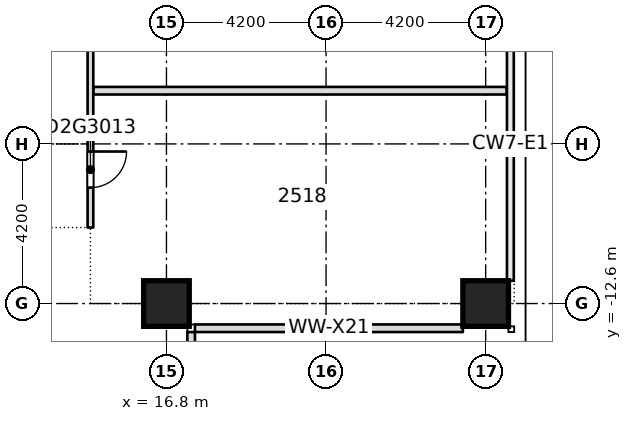
"""IFC4 building model, lengths in metres.
Left out: names, types, materials, properties, quantities, classifications, styles, units other than length and angle.
Written with IfcOpenShell. Run it as: python <this file> out.ifc"""

import sys

from ifc_helpers import new_model, si_unit, direction, frame, frame_2d, origin, origin_2d, place, context, subcontext, project, spatial, rectangle, extrude, element, fill, save


model = new_model("IFC4")
c1 = context("Model", 3, precision=1e-05, world=origin(), true_north=direction((0.0, 1.0)))
c2 = subcontext(c1, "Body", "Model", "MODEL_VIEW")
j1 = project(units=[si_unit("LENGTHUNIT", "METRE"), si_unit("PLANEANGLEUNIT", "RADIAN")], contexts=[c1])
p1 = place(None, origin())
s1 = spatial("IfcSite", under=j1, at=p1, CompositionType="ELEMENT")
p2 = place(p1, origin())
s2 = spatial("IfcBuilding", under=s1, at=p2, CompositionType="ELEMENT")
p3 = place(p2, frame((0.0, 0.0, 101.1)))
s3 = spatial("IfcBuildingStorey", under=s2, at=p3, CompositionType="ELEMENT", Elevation=101.1)
for number, where, z_axis, x_axis in (
    (1, (16.8, -12.6, -0.32), (0.0, 0.0, 1.0), (1.0, 0.0, 0.0)),
    (2, (25.2, -12.6, -0.32), (0.0, 0.0, 1.0), (1.0, 0.0, 0.0)),
):
    element("IfcColumn", number, at=place(p3, frame(where, z_axis=z_axis, x_axis=x_axis)), inside=s3, PredefinedType="COLUMN", context=c2, shape_type="SweptSolid", body=[
        extrude(rectangle(XDim=1.2, YDim=1.2, at=origin_2d()), origin(), (0.0, 0.0, 1.0), 3.45),
    ])
p4 = place(p3, frame((14.875, -7.0, 0.0), z_axis=(0.0, 0.0, 1.0), x_axis=(1.0, 0.0, 0.0)))
e3 = element("IfcWall", 3, at=p4, inside=s3, PredefinedType="PARTITIONING", context=c2, shape_type="SweptSolid", body=[
    extrude(rectangle(XDim=10.875, YDim=0.2, at=frame_2d((5.438, 0.0))), origin(), (0.0, 0.0, 1.0), 3.13),
])
p5 = place(p3, frame((14.8, -10.6, 0.0), z_axis=(0.0, 0.0, 1.0), x_axis=(0.0, 1.0, 0.0)))
e4 = element("IfcWall", 4, at=p5, inside=s3, PredefinedType="PARTITIONING", context=c2, shape_type="SweptSolid", body=[
    extrude(rectangle(XDim=32.15, YDim=0.15, at=frame_2d((16.075, 0.0))), origin(), (0.0, 0.0, 1.0), 3.13),
])
p6 = place(p5, frame((1.05, 0.0, 0.0)))
e5 = element("IfcOpeningElement", 5, at=p6, cuts=e4, PredefinedType="OPENING", context=c2, shape_type="SweptSolid", body=[
    extrude(rectangle(XDim=0.95, YDim=2.1, at=frame_2d((0.475, 1.05))), frame((0.0, 0.085, 0.0), z_axis=(0.0, -1.0, 0.0), x_axis=(1.0, 0.0, 0.0)), (0.0, 0.0, 1.0), 0.17),
])
p7 = place(p5, frame((18.475, 0.0, 0.0)))
e6 = element("IfcOpeningElement", 6, at=p7, cuts=e4, PredefinedType="OPENING", context=c2, shape_type="SweptSolid", body=[
    extrude(rectangle(XDim=1.0, YDim=2.1, at=frame_2d((0.5, 1.05))), frame((0.0, 0.085, 0.0), z_axis=(0.0, -1.0, 0.0), x_axis=(1.0, 0.0, 0.0)), (0.0, 0.0, 1.0), 0.17),
])
p8 = place(p5, frame((25.55, 0.0, 0.0)))
e7 = element("IfcOpeningElement", 7, at=p8, cuts=e4, PredefinedType="OPENING", context=c2, shape_type="SweptSolid", body=[
    extrude(rectangle(XDim=0.95, YDim=2.1, at=frame_2d((0.475, 1.05))), frame((0.0, 0.085, 0.0), z_axis=(0.0, -1.0, 0.0), x_axis=(1.0, 0.0, 0.0)), (0.0, 0.0, 1.0), 0.17),
])
p9 = place(p5, frame((29.45, 0.0, 0.0)))
e8 = element("IfcOpeningElement", 8, at=p9, cuts=e4, PredefinedType="OPENING", context=c2, shape_type="SweptSolid", body=[
    extrude(rectangle(XDim=0.95, YDim=2.1, at=frame_2d((0.475, 1.05))), frame((0.0, 0.085, 0.0), z_axis=(0.0, -1.0, 0.0), x_axis=(1.0, 0.0, 0.0)), (0.0, 0.0, 1.0), 0.17),
])
p10 = place(p5, frame((10.05, 0.0, 0.0)))
e9 = element("IfcOpeningElement", 9, at=p10, cuts=e4, PredefinedType="OPENING", context=c2, shape_type="SweptSolid", body=[
    extrude(rectangle(XDim=1.1, YDim=2.1, at=frame_2d((0.55, 1.05))), frame((0.0, 0.085, 0.0), z_axis=(0.0, -1.0, 0.0), x_axis=(1.0, 0.0, 0.0)), (0.0, 0.0, 1.0), 0.17),
])
p11 = place(p5, frame((4.85, 0.0, 0.0)))
e10 = element("IfcOpeningElement", 10, at=p11, cuts=e4, PredefinedType="OPENING", context=c2, shape_type="SweptSolid", body=[
    extrude(rectangle(XDim=1.0, YDim=2.1, at=frame_2d((0.5, 1.05))), frame((0.0, 0.085, 0.0), z_axis=(0.0, -1.0, 0.0), x_axis=(1.0, 0.0, 0.0)), (0.0, 0.0, 1.0), 0.17),
])
p12 = place(p3, frame((17.45, -20.4, 0.0), z_axis=(0.0, 0.0, 1.0), x_axis=(0.0, 1.0, 0.0)))
e11 = element("IfcWall", 11, at=p12, inside=s3, PredefinedType="STANDARD", context=c2, shape_type="SweptSolid", body=[
    extrude(rectangle(XDim=7.05, YDim=0.2, at=frame_2d((3.525, 0.0))), origin(), (0.0, 0.0, 1.0), 3.13),
])
p13 = place(p12, frame((0.35, 0.0, 0.2)))
e12 = element("IfcOpeningElement", 12, at=p13, cuts=e11, PredefinedType="OPENING", context=c2, shape_type="SweptSolid", body=[
    extrude(rectangle(XDim=1.8, YDim=2.65, at=frame_2d((0.9, 1.325))), frame((0.0, 0.11, 0.0), z_axis=(0.0, -1.0, 0.0), x_axis=(1.0, 0.0, 0.0)), (0.0, 0.0, 1.0), 0.22),
])
p14 = place(p12, frame((3.875, 0.0, 0.2)))
e13 = element("IfcOpeningElement", 13, at=p14, cuts=e11, PredefinedType="OPENING", context=c2, shape_type="SweptSolid", body=[
    extrude(rectangle(XDim=1.8, YDim=2.65, at=frame_2d((0.9, 1.325))), frame((0.0, 0.11, 0.0), z_axis=(0.0, -1.0, 0.0), x_axis=(1.0, 0.0, 0.0)), (0.0, 0.0, 1.0), 0.22),
])
p15 = place(p3, frame((17.55, -13.25, 0.0), z_axis=(0.0, 0.0, 1.0), x_axis=(1.0, 0.0, 0.0)))
e14 = element("IfcWall", 14, at=p15, inside=s3, PredefinedType="STANDARD", context=c2, shape_type="SweptSolid", body=[
    extrude(rectangle(XDim=7.05, YDim=0.2, at=frame_2d((3.525, 0.0))), origin(), (0.0, 0.0, 1.0), 3.13),
])
p16 = place(p6, origin())
e15 = element("IfcDoor", 15, at=p16, inside=s3, OperationType="SINGLE_SWING_RIGHT", PredefinedType="DOOR", context=c2, shape_type="SweptSolid", body=[
    extrude(rectangle(XDim=0.95, YDim=2.1, at=frame_2d((0.475, 1.05))), frame((0.0, 0.025, 0.0), z_axis=(0.0, -1.0, 0.0), x_axis=(1.0, 0.0, 0.0)), (0.0, 0.0, 1.0), 0.05),
])
fill(e5, e15)
save(model, sys.argv[1])
